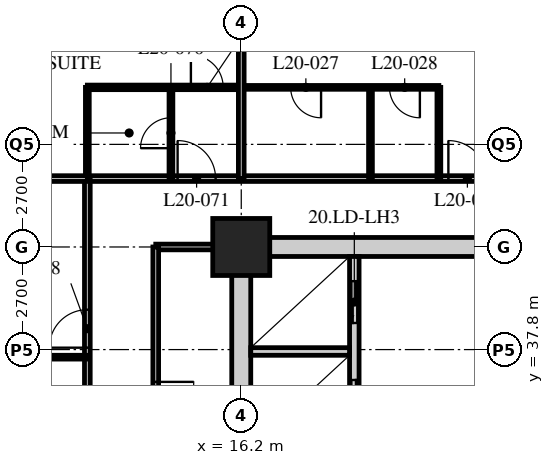
"""IFC4 building model, lengths in metres.
Left out: names, types, materials, properties, quantities, classifications, styles, units other than length and angle.
Written with IfcOpenShell. Run it as: python <this file> out.ifc"""

import sys

from ifc_helpers import new_model, si_unit, direction, frame, frame_2d, origin, origin_2d, place, context, subcontext, project, spatial, rectangle, hollow_rectangle, extrude, element, fill, save


model = new_model("IFC4")
c1 = context("Model", 3, precision=1e-05, world=origin(), true_north=direction((0.0, 1.0)))
c2 = subcontext(c1, "Body", "Model", "MODEL_VIEW")
j1 = project(units=[si_unit("LENGTHUNIT", "METRE"), si_unit("PLANEANGLEUNIT", "RADIAN")], contexts=[c1])
p1 = place(None, origin())
s1 = spatial("IfcSite", under=j1, at=p1, CompositionType="ELEMENT")
p2 = place(p1, origin())
s2 = spatial("IfcBuilding", under=s1, at=p2, CompositionType="ELEMENT")
p3 = place(p2, frame((0.0, 0.0, 80.6)))
s3 = spatial("IfcBuildingStorey", under=s2, at=p3, CompositionType="ELEMENT", Elevation=80.6)
p4 = place(p3, frame((16.2, 40.5, 0.0), z_axis=(0.0, 0.0, 1.0), x_axis=(1.0, 0.0, 0.0)))
e1 = element("IfcColumn", 1, at=p4, inside=s3, PredefinedType="COLUMN", context=c2, shape_type="SweptSolid", body=[
    extrude(hollow_rectangle(XDim=1.5, YDim=1.5, WallThickness=0.13, at=origin_2d()), origin(), (0.0, 0.0, 1.0), 3.4),
])
p5 = place(p3, frame((12.15, 42.3, 0.0), z_axis=(0.0, 0.0, 1.0), x_axis=(1.0, 0.0, 0.0)))
e2 = element("IfcWall", 2, at=p5, inside=s3, PredefinedType="PARTITIONING", context=c2, shape_type="SweptSolid", body=[
    extrude(rectangle(XDim=36.45, YDim=0.15, at=frame_2d((18.225, 0.0))), origin(), (0.0, 0.0, 1.0), 3.19),
])
p6 = place(p5, frame((9.5, 0.0, 0.0)))
e3 = element("IfcOpeningElement", 3, at=p6, cuts=e2, PredefinedType="OPENING", context=c2, shape_type="SweptSolid", body=[
    extrude(rectangle(XDim=1.0, YDim=2.1, at=frame_2d((0.5, 1.05))), frame((0.0, 0.085, 0.0), z_axis=(0.0, -1.0, 0.0), x_axis=(1.0, 0.0, 0.0)), (0.0, 0.0, 1.0), 0.17),
])
p7 = place(p5, frame((17.6, 0.0, 0.0)))
e4 = element("IfcOpeningElement", 4, at=p7, cuts=e2, PredefinedType="OPENING", context=c2, shape_type="SweptSolid", body=[
    extrude(rectangle(XDim=1.0, YDim=2.1, at=frame_2d((0.5, 1.05))), frame((0.0, 0.085, 0.0), z_axis=(0.0, -1.0, 0.0), x_axis=(1.0, 0.0, 0.0)), (0.0, 0.0, 1.0), 0.17),
])
p8 = place(p5, frame((22.7, 0.0, 0.0)))
e5 = element("IfcOpeningElement", 5, at=p8, cuts=e2, PredefinedType="OPENING", context=c2, shape_type="SweptSolid", body=[
    extrude(rectangle(XDim=1.0, YDim=2.1, at=frame_2d((0.5, 1.05))), frame((0.0, 0.085, 0.0), z_axis=(0.0, -1.0, 0.0), x_axis=(1.0, 0.0, 0.0)), (0.0, 0.0, 1.0), 0.17),
])
p9 = place(p5, frame((26.75, 0.0, 0.0)))
e6 = element("IfcOpeningElement", 6, at=p9, cuts=e2, PredefinedType="OPENING", context=c2, shape_type="SweptSolid", body=[
    extrude(rectangle(XDim=1.0, YDim=2.1, at=frame_2d((0.5, 1.05))), frame((0.0, 0.085, 0.0), z_axis=(0.0, -1.0, 0.0), x_axis=(1.0, 0.0, 0.0)), (0.0, 0.0, 1.0), 0.17),
])
p10 = place(p5, frame((30.8, 0.0, 0.0)))
e7 = element("IfcOpeningElement", 7, at=p10, cuts=e2, PredefinedType="OPENING", context=c2, shape_type="SweptSolid", body=[
    extrude(rectangle(XDim=1.0, YDim=2.1, at=frame_2d((0.5, 1.05))), frame((0.0, 0.085, 0.0), z_axis=(0.0, -1.0, 0.0), x_axis=(1.0, 0.0, 0.0)), (0.0, 0.0, 1.0), 0.17),
])
p11 = place(p5, frame((32.825, 0.0, 0.0)))
e8 = element("IfcOpeningElement", 8, at=p11, cuts=e2, PredefinedType="OPENING", context=c2, shape_type="SweptSolid", body=[
    extrude(rectangle(XDim=1.0, YDim=2.1, at=frame_2d((0.5, 1.05))), frame((0.0, 0.085, 0.0), z_axis=(0.0, -1.0, 0.0), x_axis=(1.0, 0.0, 0.0)), (0.0, 0.0, 1.0), 0.17),
])
p12 = place(p5, frame((2.375, 0.0, 0.0)))
e9 = element("IfcOpeningElement", 9, at=p12, cuts=e2, PredefinedType="OPENING", context=c2, shape_type="SweptSolid", body=[
    extrude(rectangle(XDim=1.0, YDim=2.1, at=frame_2d((0.5, 1.05))), frame((0.0, 0.085, 0.0), z_axis=(0.0, -1.0, 0.0), x_axis=(1.0, 0.0, 0.0)), (0.0, 0.0, 1.0), 0.17),
])
p13 = place(p3, frame((12.15, 16.2, 0.0), z_axis=(0.0, 0.0, 1.0), x_axis=(0.0, 1.0, 0.0)))
e10 = element("IfcWall", 10, at=p13, inside=s3, PredefinedType="PARTITIONING", context=c2, shape_type="SweptSolid", body=[
    extrude(rectangle(XDim=26.1, YDim=0.15, at=frame_2d((13.05, 0.0))), origin(), (0.0, 0.0, 1.0), 3.19),
])
p14 = place(p13, frame((0.3, 0.0, 0.0)))
e11 = element("IfcOpeningElement", 11, at=p14, cuts=e10, PredefinedType="OPENING", context=c2, shape_type="SweptSolid", body=[
    extrude(rectangle(XDim=1.0, YDim=2.1, at=frame_2d((0.5, 1.05))), frame((0.0, 0.085, 0.0), z_axis=(0.0, -1.0, 0.0), x_axis=(1.0, 0.0, 0.0)), (0.0, 0.0, 1.0), 0.17),
])
p15 = place(p13, frame((6.5, 0.0, 0.0)))
e12 = element("IfcOpeningElement", 12, at=p15, cuts=e10, PredefinedType="OPENING", context=c2, shape_type="SweptSolid", body=[
    extrude(rectangle(XDim=1.0, YDim=2.1, at=frame_2d((0.5, 1.05))), frame((0.0, 0.085, 0.0), z_axis=(0.0, -1.0, 0.0), x_axis=(1.0, 0.0, 0.0)), (0.0, 0.0, 1.0), 0.17),
])
p16 = place(p13, frame((13.55, 0.0, 0.0)))
e13 = element("IfcOpeningElement", 13, at=p16, cuts=e10, PredefinedType="OPENING", context=c2, shape_type="SweptSolid", body=[
    extrude(rectangle(XDim=1.0, YDim=2.1, at=frame_2d((0.5, 1.05))), frame((0.0, 0.085, 0.0), z_axis=(0.0, -1.0, 0.0), x_axis=(1.0, 0.0, 0.0)), (0.0, 0.0, 1.0), 0.17),
])
p17 = place(p13, frame((21.65, 0.0, 0.0)))
e14 = element("IfcOpeningElement", 14, at=p17, cuts=e10, PredefinedType="OPENING", context=c2, shape_type="SweptSolid", body=[
    extrude(rectangle(XDim=1.0, YDim=2.1, at=frame_2d((0.5, 1.05))), frame((0.0, 0.085, 0.0), z_axis=(0.0, -1.0, 0.0), x_axis=(1.0, 0.0, 0.0)), (0.0, 0.0, 1.0), 0.17),
])
p18 = place(p3, frame((16.0, 40.5, 0.0), z_axis=(0.0, 0.0, 1.0), x_axis=(-1.0, 0.0, 0.0)))
e15 = element("IfcWall", 15, at=p18, inside=s3, PredefinedType="PARTITIONING", context=c2, shape_type="SweptSolid", body=[
    extrude(rectangle(XDim=2.05, YDim=0.15, at=frame_2d((1.025, 0.0))), origin(), (0.0, 0.0, 1.0), 2.428),
])
p19 = place(p3, frame((13.95, 40.5, 0.0), z_axis=(0.0, 0.0, 1.0), x_axis=(0.0, -1.0, 0.0)))
e16 = element("IfcWall", 16, at=p19, inside=s3, PredefinedType="PARTITIONING", context=c2, shape_type="SweptSolid", body=[
    extrude(rectangle(XDim=22.5, YDim=0.15, at=frame_2d((11.25, 0.0))), origin(), (0.0, 0.0, 1.0), 3.19),
])
p20 = place(p19, frame((11.65, 0.0, 0.0)))
e17 = element("IfcOpeningElement", 17, at=p20, cuts=e16, PredefinedType="OPENING", context=c2, shape_type="SweptSolid", body=[
    extrude(rectangle(XDim=1.0, YDim=2.1, at=frame_2d((0.5, 1.05))), frame((0.0, 0.085, 0.0), z_axis=(0.0, -1.0, 0.0), x_axis=(1.0, 0.0, 0.0)), (0.0, 0.0, 1.0), 0.17),
])
p21 = place(p19, frame((3.55, 0.0, 0.0)))
e18 = element("IfcOpeningElement", 18, at=p21, cuts=e16, PredefinedType="OPENING", context=c2, shape_type="SweptSolid", body=[
    extrude(rectangle(XDim=1.0, YDim=2.1, at=frame_2d((0.5, 1.05))), frame((0.0, 0.085, 0.0), z_axis=(0.0, -1.0, 0.0), x_axis=(1.0, 0.0, 0.0)), (0.0, 0.0, 1.0), 0.17),
])
p22 = place(p3, frame((16.2, 44.7, 0.0), z_axis=(0.0, 0.0, 1.0), x_axis=(1.0, 0.0, 0.0)))
e19 = element("IfcWall", 19, at=p22, inside=s3, PredefinedType="PARTITIONING", context=c2, shape_type="SweptSolid", body=[
    extrude(rectangle(XDim=5.2, YDim=0.1, at=frame_2d((2.6, 0.0))), origin(), (0.0, 0.0, 1.0), 3.19),
])
p23 = place(p22, frame((1.3, 0.0, 0.0)))
e20 = element("IfcOpeningElement", 20, at=p23, cuts=e19, PredefinedType="OPENING", context=c2, shape_type="SweptSolid", body=[
    extrude(rectangle(XDim=0.8, YDim=2.1, at=frame_2d((0.4, 1.05))), frame((0.0, 0.06, 0.0), z_axis=(0.0, -1.0, 0.0), x_axis=(1.0, 0.0, 0.0)), (0.0, 0.0, 1.0), 0.12),
])
p24 = place(p22, frame((3.9, 0.0, 0.0)))
e21 = element("IfcOpeningElement", 21, at=p24, cuts=e19, PredefinedType="OPENING", context=c2, shape_type="SweptSolid", body=[
    extrude(rectangle(XDim=0.8, YDim=2.1, at=frame_2d((0.4, 1.05))), frame((0.0, 0.06, 0.0), z_axis=(0.0, -1.0, 0.0), x_axis=(1.0, 0.0, 0.0)), (0.0, 0.0, 1.0), 0.12),
])
for number, where, z_axis, x_axis in (
    (22, (19.6, 42.3, 0.0), (0.0, 0.0, 1.0), (0.0, 1.0, 0.0)),
    (23, (21.4, 42.3, 0.0), (0.0, 0.0, 1.0), (0.0, 1.0, 0.0)),
    (24, (12.15, 37.6, 0.0), (0.0, 0.0, 1.0), (-1.0, 0.0, 0.0)),
):
    element("IfcWall", number, at=place(p3, frame(where, z_axis=z_axis, x_axis=x_axis)), inside=s3, PredefinedType="PARTITIONING", context=c2, shape_type="SweptSolid", body=[
        extrude(rectangle(XDim=2.4, YDim=0.1, at=frame_2d((1.2, 0.0))), origin(), (0.0, 0.0, 1.0), 3.19),
    ])
p25 = place(p3, frame((12.15, 44.7, 0.0), z_axis=(0.0, 0.0, 1.0), x_axis=(1.0, 0.0, 0.0)))
e25 = element("IfcWall", 25, at=p25, inside=s3, PredefinedType="PARTITIONING", context=c2, shape_type="SweptSolid", body=[
    extrude(rectangle(XDim=4.05, YDim=0.12, at=frame_2d((2.025, 0.0))), origin(), (0.0, 0.0, 1.0), 3.19),
])
p26 = place(p25, frame((2.725, 0.0, 0.0)))
e26 = element("IfcOpeningElement", 26, at=p26, cuts=e25, PredefinedType="OPENING", context=c2, shape_type="SweptSolid", body=[
    extrude(rectangle(XDim=0.85, YDim=2.1, at=frame_2d((0.425, 1.05))), frame((0.0, 0.07, 0.0), z_axis=(0.0, -1.0, 0.0), x_axis=(1.0, 0.0, 0.0)), (0.0, 0.0, 1.0), 0.14),
])
p27 = place(p3, frame((14.35, 42.3, 0.0), z_axis=(0.0, 0.0, 1.0), x_axis=(0.0, 1.0, 0.0)))
e27 = element("IfcWall", 27, at=p27, inside=s3, PredefinedType="PARTITIONING", context=c2, shape_type="SweptSolid", body=[
    extrude(rectangle(XDim=2.4, YDim=0.1, at=frame_2d((1.2, 0.0))), origin(), (0.0, 0.0, 1.0), 3.19),
])
p28 = place(p27, frame((0.8, 0.0, 0.0)))
e28 = element("IfcOpeningElement", 28, at=p28, cuts=e27, PredefinedType="OPENING", context=c2, shape_type="SweptSolid", body=[
    extrude(rectangle(XDim=0.8, YDim=2.1, at=frame_2d((0.4, 1.05))), frame((0.0, 0.06, 0.0), z_axis=(0.0, -1.0, 0.0), x_axis=(1.0, 0.0, 0.0)), (0.0, 0.0, 1.0), 0.12),
])
p29 = place(p3, frame((12.15, 42.3, 0.0), z_axis=(0.0, 0.0, 1.0), x_axis=(0.0, 1.0, 0.0)))
e29 = element("IfcWall", 29, at=p29, inside=s3, PredefinedType="PARTITIONING", context=c2, shape_type="SweptSolid", body=[
    extrude(rectangle(XDim=2.4, YDim=0.1, at=frame_2d((1.2, 0.0))), origin(), (0.0, 0.0, 1.0), 3.19),
])
p30 = place(p3, frame((4.35, 42.3, 0.0), z_axis=(0.0, 0.0, 1.0), x_axis=(1.0, 0.0, 0.0)))
e30 = element("IfcWall", 30, at=p30, inside=s3, PredefinedType="PARTITIONING", context=c2, shape_type="SweptSolid", body=[
    extrude(rectangle(XDim=7.8, YDim=0.15, at=frame_2d((3.9, 0.0))), origin(), (0.0, 0.0, 1.0), 3.19),
])
p31 = place(p3, frame((16.2, 42.3, 0.0), z_axis=(0.0, 0.0, 1.0), x_axis=(0.0, 1.0, 0.0)))
e31 = element("IfcWall", 31, at=p31, inside=s3, PredefinedType="PARTITIONING", context=c2, shape_type="SweptSolid", body=[
    extrude(rectangle(XDim=6.0, YDim=0.15, at=frame_2d((3.0, 0.0))), origin(), (0.0, 0.0, 1.0), 2.428),
])
p32 = place(p3, frame((15.95, 40.5, 0.0), z_axis=(0.0, 0.0, 1.0), x_axis=(1.0, 0.0, 0.0)))
e32 = element("IfcWall", 32, at=p32, inside=s3, PredefinedType="SOLIDWALL", context=c2, shape_type="SweptSolid", body=[
    extrude(rectangle(XDim=24.8, YDim=0.5, at=frame_2d((12.4, 0.0))), origin(), (0.0, 0.0, 1.0), 2.428),
])
p33 = place(p32, frame((11.5, 0.0, 0.0)))
e33 = element("IfcOpeningElement", 33, at=p33, cuts=e32, PredefinedType="OPENING", context=c2, shape_type="SweptSolid", body=[
    extrude(rectangle(XDim=1.8, YDim=2.4, at=frame_2d((0.9, 1.2))), frame((0.0, 0.26, 0.0), z_axis=(0.0, -1.0, 0.0), x_axis=(1.0, 0.0, 0.0)), (0.0, 0.0, 1.0), 0.52),
])
p34 = place(p3, frame((16.2, 24.55, 0.0), z_axis=(0.0, 0.0, 1.0), x_axis=(0.0, 1.0, 0.0)))
e34 = element("IfcWall", 34, at=p34, inside=s3, PredefinedType="SOLIDWALL", context=c2, shape_type="SweptSolid", body=[
    extrude(rectangle(XDim=15.7, YDim=0.5, at=frame_2d((7.85, 0.0))), origin(), (0.0, 0.0, 1.0), 2.428),
])
p35 = place(p3, frame((19.175, 32.5, 0.0), z_axis=(0.0, 0.0, 1.0), x_axis=(0.0, 1.0, 0.0)))
e35 = element("IfcWall", 35, at=p35, inside=s3, PredefinedType="SOLIDWALL", context=c2, shape_type="SweptSolid", body=[
    extrude(rectangle(XDim=7.75, YDim=0.25, at=frame_2d((3.875, 0.0))), origin(), (0.0, 0.0, 1.0), 3.19),
])
p36 = place(p35, frame((0.8, 0.0, 0.0)))
e36 = element("IfcOpeningElement", 36, at=p36, cuts=e35, PredefinedType="OPENING", context=c2, shape_type="SweptSolid", body=[
    extrude(rectangle(XDim=1.1, YDim=2.4, at=frame_2d((0.55, 1.2))), frame((0.0, 0.135, 0.0), z_axis=(0.0, -1.0, 0.0), x_axis=(1.0, 0.0, 0.0)), (0.0, 0.0, 1.0), 0.27),
])
p37 = place(p35, frame((3.4, 0.0, 0.0)))
e37 = element("IfcOpeningElement", 37, at=p37, cuts=e35, PredefinedType="OPENING", context=c2, shape_type="SweptSolid", body=[
    extrude(rectangle(XDim=1.1, YDim=2.4, at=frame_2d((0.55, 1.2))), frame((0.0, 0.135, 0.0), z_axis=(0.0, -1.0, 0.0), x_axis=(1.0, 0.0, 0.0)), (0.0, 0.0, 1.0), 0.27),
])
p38 = place(p35, frame((6.0, 0.0, 0.0)))
e38 = element("IfcOpeningElement", 38, at=p38, cuts=e35, PredefinedType="OPENING", context=c2, shape_type="SweptSolid", body=[
    extrude(rectangle(XDim=1.1, YDim=2.4, at=frame_2d((0.55, 1.2))), frame((0.0, 0.135, 0.0), z_axis=(0.0, -1.0, 0.0), x_axis=(1.0, 0.0, 0.0)), (0.0, 0.0, 1.0), 0.27),
])
p39 = place(p3, frame((16.45, 37.75, 0.0), z_axis=(0.0, 0.0, 1.0), x_axis=(1.0, 0.0, 0.0)))
e39 = element("IfcWall", 39, at=p39, inside=s3, PredefinedType="SOLIDWALL", context=c2, shape_type="SweptSolid", body=[
    extrude(rectangle(XDim=2.6, YDim=0.2, at=frame_2d((1.3, 0.0))), origin(), (0.0, 0.0, 1.0), 3.19),
])
p40 = place(p21, origin())
e40 = element("IfcDoor", 40, at=p40, inside=s3, OperationType="SINGLE_SWING_LEFT", PredefinedType="DOOR", context=c2, shape_type="SweptSolid", body=[
    extrude(rectangle(XDim=1.0, YDim=2.1, at=frame_2d((0.5, 1.05))), frame((0.0, 0.025, 0.0), z_axis=(0.0, -1.0, 0.0), x_axis=(1.0, 0.0, 0.0)), (0.0, 0.0, 1.0), 0.05),
])
fill(e18, e40)
p41 = place(p23, origin())
e41 = element("IfcDoor", 41, at=p41, inside=s3, OperationType="SINGLE_SWING_LEFT", PredefinedType="DOOR", context=c2, shape_type="SweptSolid", body=[
    extrude(rectangle(XDim=0.8, YDim=2.1, at=frame_2d((0.4, 1.05))), frame((0.0, 0.025, 0.0), z_axis=(0.0, -1.0, 0.0), x_axis=(1.0, 0.0, 0.0)), (0.0, 0.0, 1.0), 0.05),
])
fill(e20, e41)
p42 = place(p24, origin())
e42 = element("IfcDoor", 42, at=p42, inside=s3, OperationType="SINGLE_SWING_LEFT", PredefinedType="DOOR", context=c2, shape_type="SweptSolid", body=[
    extrude(rectangle(XDim=0.8, YDim=2.1, at=frame_2d((0.4, 1.05))), frame((0.0, 0.025, 0.0), z_axis=(0.0, -1.0, 0.0), x_axis=(1.0, 0.0, 0.0)), (0.0, 0.0, 1.0), 0.05),
])
fill(e21, e42)
p43 = place(p6, origin())
e43 = element("IfcDoor", 43, at=p43, inside=s3, OperationType="SINGLE_SWING_LEFT", PredefinedType="DOOR", context=c2, shape_type="SweptSolid", body=[
    extrude(rectangle(XDim=1.0, YDim=2.1, at=frame_2d((0.5, 1.05))), frame((0.0, 0.025, 0.0), z_axis=(0.0, -1.0, 0.0), x_axis=(1.0, 0.0, 0.0)), (0.0, 0.0, 1.0), 0.05),
])
fill(e3, e43)
p44 = place(p17, origin())
e44 = element("IfcDoor", 44, at=p44, inside=s3, OperationType="SINGLE_SWING_LEFT", PredefinedType="DOOR", context=c2, shape_type="SweptSolid", body=[
    extrude(rectangle(XDim=1.0, YDim=2.1, at=frame_2d((0.5, 1.05))), frame((0.0, 0.025, 0.0), z_axis=(0.0, -1.0, 0.0), x_axis=(1.0, 0.0, 0.0)), (0.0, 0.0, 1.0), 0.05),
])
fill(e14, e44)
p45 = place(p28, origin())
e45 = element("IfcDoor", 45, at=p45, inside=s3, OperationType="SINGLE_SWING_LEFT", PredefinedType="DOOR", context=c2, shape_type="SweptSolid", body=[
    extrude(rectangle(XDim=0.8, YDim=2.1, at=frame_2d((0.4, 1.05))), frame((0.0, 0.025, 0.0), z_axis=(0.0, -1.0, 0.0), x_axis=(1.0, 0.0, 0.0)), (0.0, 0.0, 1.0), 0.05),
])
fill(e28, e45)
p46 = place(p12, origin())
e46 = element("IfcDoor", 46, at=p46, inside=s3, OperationType="SINGLE_SWING_LEFT", PredefinedType="DOOR", context=c2, shape_type="SweptSolid", body=[
    extrude(rectangle(XDim=1.0, YDim=2.1, at=frame_2d((0.5, 1.05))), frame((0.0, 0.025, 0.0), z_axis=(0.0, -1.0, 0.0), x_axis=(1.0, 0.0, 0.0)), (0.0, 0.0, 1.0), 0.05),
])
fill(e9, e46)
p47 = place(p26, origin())
e47 = element("IfcDoor", 47, at=p47, inside=s3, OperationType="SINGLE_SWING_LEFT", PredefinedType="DOOR", context=c2, shape_type="SweptSolid", body=[
    extrude(rectangle(XDim=0.85, YDim=2.1, at=frame_2d((0.425, 1.05))), frame((0.0, 0.025, 0.0), z_axis=(0.0, -1.0, 0.0), x_axis=(1.0, 0.0, 0.0)), (0.0, 0.0, 1.0), 0.05),
])
fill(e26, e47)
p48 = place(p37, origin())
e48 = element("IfcDoor", 48, at=p48, inside=s3, OperationType="DOUBLE_DOOR_SLIDING", PredefinedType="DOOR", context=c2, shape_type="SweptSolid", body=[
    extrude(rectangle(XDim=1.1, YDim=2.4, at=frame_2d((0.55, 1.2))), frame((0.0, 0.025, 0.0), z_axis=(0.0, -1.0, 0.0), x_axis=(1.0, 0.0, 0.0)), (0.0, 0.0, 1.0), 0.05),
])
fill(e37, e48)
p49 = place(p38, origin())
e49 = element("IfcDoor", 49, at=p49, inside=s3, OperationType="DOUBLE_DOOR_SLIDING", PredefinedType="DOOR", context=c2, shape_type="SweptSolid", body=[
    extrude(rectangle(XDim=1.1, YDim=2.4, at=frame_2d((0.55, 1.2))), frame((0.0, 0.025, 0.0), z_axis=(0.0, -1.0, 0.0), x_axis=(1.0, 0.0, 0.0)), (0.0, 0.0, 1.0), 0.05),
])
fill(e38, e49)
save(model, sys.argv[1])
